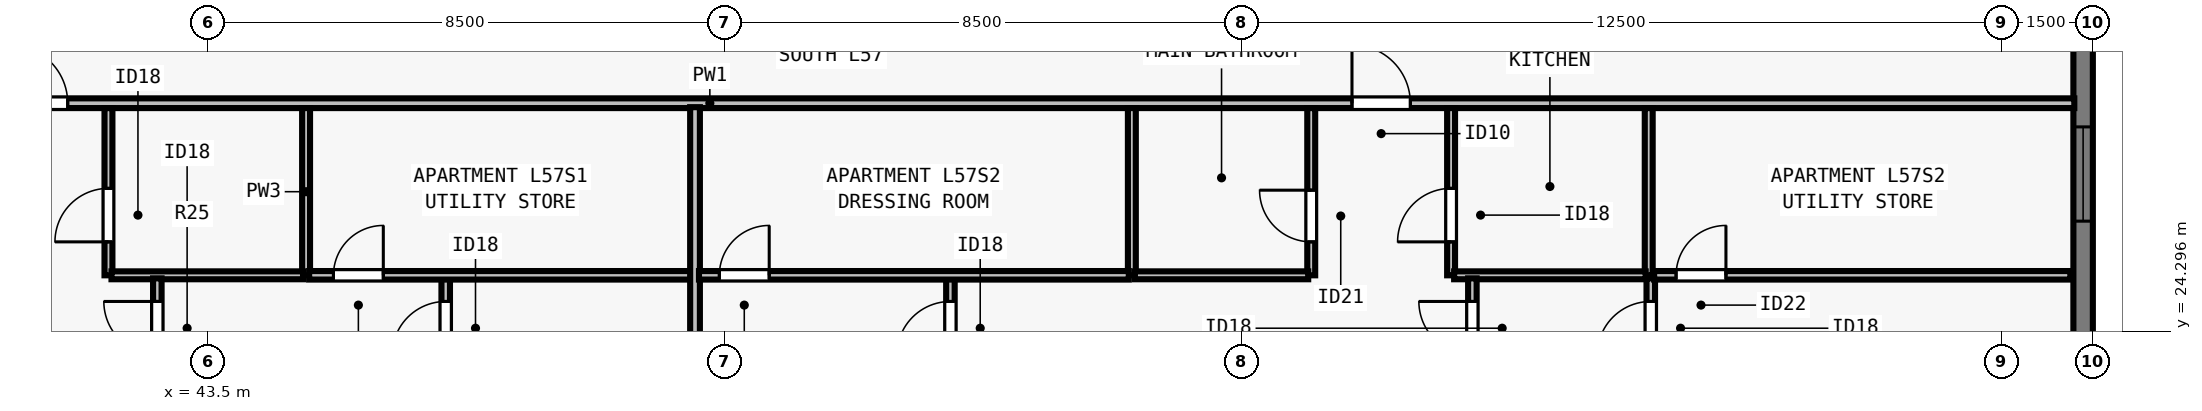
"""IFC4 building model, lengths in metres.
Left out: names, types, materials, properties, quantities, classifications, styles, units other than length and angle.
Written with IfcOpenShell. Run it as: python <this file> out.ifc"""

import sys

from ifc_helpers import new_model, si_unit, direction, frame, frame_2d, origin, place, context, subcontext, project, spatial, rectangle, extrude, element, fill, save


model = new_model("IFC4")
c1 = context("Model", 3, precision=1e-05, world=origin(), true_north=direction((0.0, 1.0)))
c2 = subcontext(c1, "Body", "Model", "MODEL_VIEW")
j1 = project(units=[si_unit("LENGTHUNIT", "METRE"), si_unit("PLANEANGLEUNIT", "RADIAN")], contexts=[c1])
p1 = place(None, origin())
s1 = spatial("IfcSite", under=j1, at=p1, CompositionType="ELEMENT")
p2 = place(p1, origin())
s2 = spatial("IfcBuilding", under=s1, at=p2, CompositionType="ELEMENT")
p3 = place(p2, frame((0.0, 0.0, 209.5)))
s3 = spatial("IfcBuildingStorey", under=s2, at=p3, CompositionType="ELEMENT", Elevation=209.5)
p4 = place(p3, frame((74.34, 56.5, 0.0), z_axis=(0.0, 0.0, 1.0), x_axis=(0.0, -1.0, 0.0)))
e1 = element("IfcWall", 1, at=p4, inside=s3, PredefinedType="SOLIDWALL", context=c2, shape_type="SweptSolid", body=[
    extrude(rectangle(XDim=34.702, YDim=0.32, at=frame_2d((17.351, 0.0))), origin(), (0.0, 0.0, 1.0), 3.29),
])
p5 = place(p4, frame((4.163, 0.0, 0.8)))
e2 = element("IfcOpeningElement", 2, at=p5, cuts=e1, PredefinedType="OPENING", context=c2, shape_type="SweptSolid", body=[
    extrude(rectangle(XDim=1.85, YDim=1.678, at=frame_2d((0.925, 0.839))), frame((0.0, 0.17, 0.0), z_axis=(0.0, -1.0, 0.0), x_axis=(1.0, 0.0, 0.0)), (0.0, 0.0, 1.0), 0.34),
])
p6 = place(p4, frame((6.888, 0.0, 0.8)))
e3 = element("IfcOpeningElement", 3, at=p6, cuts=e1, PredefinedType="OPENING", context=c2, shape_type="SweptSolid", body=[
    extrude(rectangle(XDim=1.55, YDim=1.678, at=frame_2d((0.775, 0.839))), frame((0.0, 0.17, 0.0), z_axis=(0.0, -1.0, 0.0), x_axis=(1.0, 0.0, 0.0)), (0.0, 0.0, 1.0), 0.34),
])
p7 = place(p4, frame((10.113, 0.0, 0.8)))
e4 = element("IfcOpeningElement", 4, at=p7, cuts=e1, PredefinedType="OPENING", context=c2, shape_type="SweptSolid", body=[
    extrude(rectangle(XDim=1.85, YDim=1.678, at=frame_2d((0.925, 0.839))), frame((0.0, 0.17, 0.0), z_axis=(0.0, -1.0, 0.0), x_axis=(1.0, 0.0, 0.0)), (0.0, 0.0, 1.0), 0.34),
])
p8 = place(p4, frame((14.888, 0.0, 0.8)))
e5 = element("IfcOpeningElement", 5, at=p8, cuts=e1, PredefinedType="OPENING", context=c2, shape_type="SweptSolid", body=[
    extrude(rectangle(XDim=1.55, YDim=1.678, at=frame_2d((0.775, 0.839))), frame((0.0, 0.17, 0.0), z_axis=(0.0, -1.0, 0.0), x_axis=(1.0, 0.0, 0.0)), (0.0, 0.0, 1.0), 0.34),
])
p9 = place(p4, frame((18.114, 0.0, 0.8)))
e6 = element("IfcOpeningElement", 6, at=p9, cuts=e1, PredefinedType="OPENING", context=c2, shape_type="SweptSolid", body=[
    extrude(rectangle(XDim=1.85, YDim=1.678, at=frame_2d((0.925, 0.839))), frame((0.0, 0.17, 0.0), z_axis=(0.0, -1.0, 0.0), x_axis=(1.0, 0.0, 0.0)), (0.0, 0.0, 1.0), 0.34),
])
p10 = place(p4, frame((23.614, 0.0, 0.8)))
e7 = element("IfcOpeningElement", 7, at=p10, cuts=e1, PredefinedType="OPENING", context=c2, shape_type="SweptSolid", body=[
    extrude(rectangle(XDim=1.85, YDim=1.678, at=frame_2d((0.925, 0.839))), frame((0.0, 0.17, 0.0), z_axis=(0.0, -1.0, 0.0), x_axis=(1.0, 0.0, 0.0)), (0.0, 0.0, 1.0), 0.34),
])
p11 = place(p4, frame((28.839, 0.0, 0.8)))
e8 = element("IfcOpeningElement", 8, at=p11, cuts=e1, PredefinedType="OPENING", context=c2, shape_type="SweptSolid", body=[
    extrude(rectangle(XDim=1.55, YDim=1.678, at=frame_2d((0.775, 0.839))), frame((0.0, 0.17, 0.0), z_axis=(0.0, -1.0, 0.0), x_axis=(1.0, 0.0, 0.0)), (0.0, 0.0, 1.0), 0.34),
])
p12 = place(p3, frame((29.805, 28.05, 0.0), z_axis=(0.0, 0.0, 1.0), x_axis=(1.0, 0.0, 0.0)))
e9 = element("IfcWall", 9, at=p12, inside=s3, PredefinedType="PARTITIONING", context=c2, shape_type="SweptSolid", body=[
    extrude(rectangle(XDim=44.39, YDim=0.16, at=frame_2d((22.195, 0.0))), origin(), (0.0, 0.0, 1.0), 2.958),
])
p13 = place(p12, frame((10.431, 0.0, 0.0)))
e10 = element("IfcOpeningElement", 10, at=p13, cuts=e9, PredefinedType="OPENING", context=c2, shape_type="SweptSolid", body=[
    extrude(rectangle(XDim=0.96, YDim=2.18, at=frame_2d((0.48, 1.09))), frame((0.0, 0.09, 0.0), z_axis=(0.0, -1.0, 0.0), x_axis=(1.0, 0.0, 0.0)), (0.0, 0.0, 1.0), 0.18),
])
p14 = place(p12, frame((32.511, 0.0, 0.0)))
e11 = element("IfcOpeningElement", 11, at=p14, cuts=e9, PredefinedType="OPENING", context=c2, shape_type="SweptSolid", body=[
    extrude(rectangle(XDim=0.96, YDim=2.18, at=frame_2d((0.48, 1.09))), frame((0.0, 0.09, 0.0), z_axis=(0.0, -1.0, 0.0), x_axis=(1.0, 0.0, 0.0)), (0.0, 0.0, 1.0), 0.18),
])
p15 = place(p3, frame((45.116, 25.22, 0.0), z_axis=(0.0, 0.0, 1.0), x_axis=(0.0, 1.0, 0.0)))
e12 = element("IfcWall", 12, at=p15, inside=s3, PredefinedType="PLUMBINGWALL", context=c2, shape_type="SweptSolid", body=[
    extrude(rectangle(XDim=2.75, YDim=0.13, at=frame_2d((1.375, 0.0))), origin(), (0.0, 0.0, 1.0), 3.29),
])
p16 = place(p3, frame((41.866, 25.22, 0.0), z_axis=(0.0, 0.0, 1.0), x_axis=(0.0, 1.0, 0.0)))
e13 = element("IfcWall", 13, at=p16, inside=s3, PredefinedType="PLUMBINGWALL", context=c2, shape_type="SweptSolid", body=[
    extrude(rectangle(XDim=2.75, YDim=0.13, at=frame_2d((1.375, 0.0))), origin(), (0.0, 0.0, 1.0), 2.573),
])
p17 = place(p16, frame((0.55, 0.0, 0.0)))
e14 = element("IfcOpeningElement", 14, at=p17, cuts=e13, PredefinedType="OPENING", context=c2, shape_type="SweptSolid", body=[
    extrude(rectangle(XDim=0.88, YDim=2.1, at=frame_2d((0.44, 1.05))), frame((0.0, 0.075, 0.0), z_axis=(0.0, -1.0, 0.0), x_axis=(1.0, 0.0, 0.0)), (0.0, 0.0, 1.0), 0.15),
])
p18 = place(p3, frame((41.916, 25.22, 0.0), z_axis=(0.0, 0.0, 1.0), x_axis=(1.0, 0.0, 0.0)))
e15 = element("IfcWall", 15, at=p18, inside=s3, PredefinedType="PLUMBINGWALL", context=c2, shape_type="SweptSolid", body=[
    extrude(rectangle(XDim=3.15, YDim=0.13, at=frame_2d((1.575, 0.0))), origin(), (0.0, 0.0, 1.0), 3.29),
])
p19 = place(p3, frame((47.413, 16.88, 0.0), z_axis=(0.0, 0.0, 1.0), x_axis=(0.0, 1.0, 0.0)))
e16 = element("IfcWall", 16, at=p19, inside=s3, PredefinedType="PARTITIONING", context=c2, shape_type="SweptSolid", body=[
    extrude(rectangle(XDim=8.38, YDim=0.14, at=frame_2d((4.19, 0.0))), origin(), (0.0, 0.0, 1.0), 2.573),
])
p20 = place(p19, frame((7.03, 0.0, 0.0)))
e17 = element("IfcOpeningElement", 17, at=p20, cuts=e16, PredefinedType="OPENING", context=c2, shape_type="SweptSolid", body=[
    extrude(rectangle(XDim=0.88, YDim=2.1, at=frame_2d((0.44, 1.05))), frame((0.0, 0.08, 0.0), z_axis=(0.0, -1.0, 0.0), x_axis=(1.0, 0.0, 0.0)), (0.0, 0.0, 1.0), 0.16),
])
p21 = place(p3, frame((45.166, 25.22, 0.0), z_axis=(0.0, 0.0, 1.0), x_axis=(1.0, 0.0, 0.0)))
e18 = element("IfcWall", 18, at=p21, inside=s3, PredefinedType="PARTITIONING", context=c2, shape_type="SweptSolid", body=[
    extrude(rectangle(XDim=6.396, YDim=0.14, at=frame_2d((3.198, 0.0))), origin(), (0.0, 0.0, 1.0), 3.29),
])
p22 = place(p21, frame((0.4, 0.0, 0.0)))
e19 = element("IfcOpeningElement", 19, at=p22, cuts=e18, PredefinedType="OPENING", context=c2, shape_type="SweptSolid", body=[
    extrude(rectangle(XDim=0.82, YDim=2.1, at=frame_2d((0.41, 1.05))), frame((0.0, 0.08, 0.0), z_axis=(0.0, -1.0, 0.0), x_axis=(1.0, 0.0, 0.0)), (0.0, 0.0, 1.0), 0.16),
])
p23 = place(p3, frame((42.67, 16.88, 0.0), z_axis=(0.0, 0.0, 1.0), x_axis=(0.0, 1.0, 0.0)))
e20 = element("IfcWall", 20, at=p23, inside=s3, PredefinedType="PARTITIONING", context=c2, shape_type="SweptSolid", body=[
    extrude(rectangle(XDim=8.29, YDim=0.14, at=frame_2d((4.145, 0.0))), origin(), (0.0, 0.0, 1.0), 3.29),
])
p24 = place(p23, frame((7.03, 0.0, 0.0)))
e21 = element("IfcOpeningElement", 21, at=p24, cuts=e20, PredefinedType="OPENING", context=c2, shape_type="SweptSolid", body=[
    extrude(rectangle(XDim=0.88, YDim=2.1, at=frame_2d((0.44, 1.05))), frame((0.0, 0.08, 0.0), z_axis=(0.0, -1.0, 0.0), x_axis=(1.0, 0.0, 0.0)), (0.0, 0.0, 1.0), 0.16),
])
p25 = place(p3, frame((51.512, 16.805, 0.0), z_axis=(0.0, 0.0, 1.0), x_axis=(0.0, 1.0, 0.0)))
e22 = element("IfcWall", 22, at=p25, inside=s3, PredefinedType="PARTITIONING", context=c2, shape_type="SweptSolid", body=[
    extrude(rectangle(XDim=11.18, YDim=0.16, at=frame_2d((5.59, 0.0))), origin(), (0.0, 0.0, 1.0), 2.958),
])
p26 = place(p3, frame((58.696, 25.22, 0.0), z_axis=(0.0, 0.0, 1.0), x_axis=(0.0, 1.0, 0.0)))
e23 = element("IfcWall", 23, at=p26, inside=s3, PredefinedType="PLUMBINGWALL", context=c2, shape_type="SweptSolid", body=[
    extrude(rectangle(XDim=2.75, YDim=0.13, at=frame_2d((1.375, 0.0))), origin(), (0.0, 0.0, 1.0), 3.29),
])
p27 = place(p3, frame((61.646, 25.22, 0.0), z_axis=(0.0, 0.0, 1.0), x_axis=(0.0, 1.0, 0.0)))
e24 = element("IfcWall", 24, at=p27, inside=s3, PredefinedType="PLUMBINGWALL", context=c2, shape_type="SweptSolid", body=[
    extrude(rectangle(XDim=2.75, YDim=0.13, at=frame_2d((1.375, 0.0))), origin(), (0.0, 0.0, 1.0), 3.29),
])
p28 = place(p27, frame((0.55, 0.0, 0.0)))
e25 = element("IfcOpeningElement", 25, at=p28, cuts=e24, PredefinedType="OPENING", context=c2, shape_type="SweptSolid", body=[
    extrude(rectangle(XDim=0.85, YDim=2.08, at=frame_2d((0.425, 1.04))), frame((0.0, 0.075, 0.0), z_axis=(0.0, -1.0, 0.0), x_axis=(1.0, 0.0, 0.0)), (0.0, 0.0, 1.0), 0.15),
])
p29 = place(p3, frame((58.746, 25.22, 0.0), z_axis=(0.0, 0.0, 1.0), x_axis=(1.0, 0.0, 0.0)))
e26 = element("IfcWall", 26, at=p29, inside=s3, PredefinedType="PLUMBINGWALL", context=c2, shape_type="SweptSolid", body=[
    extrude(rectangle(XDim=2.85, YDim=0.13, at=frame_2d((1.425, 0.0))), origin(), (0.0, 0.0, 1.0), 3.29),
])
p30 = place(p3, frame((67.196, 25.22, 0.0), z_axis=(0.0, 0.0, 1.0), x_axis=(0.0, 1.0, 0.0)))
e27 = element("IfcWall", 27, at=p30, inside=s3, PredefinedType="PLUMBINGWALL", context=c2, shape_type="SweptSolid", body=[
    extrude(rectangle(XDim=2.75, YDim=0.13, at=frame_2d((1.375, 0.0))), origin(), (0.0, 0.0, 1.0), 3.29),
])
p31 = place(p3, frame((63.946, 25.22, 0.0), z_axis=(0.0, 0.0, 1.0), x_axis=(0.0, 1.0, 0.0)))
e28 = element("IfcWall", 28, at=p31, inside=s3, PredefinedType="PLUMBINGWALL", context=c2, shape_type="SweptSolid", body=[
    extrude(rectangle(XDim=2.75, YDim=0.13, at=frame_2d((1.375, 0.0))), origin(), (0.0, 0.0, 1.0), 2.573),
])
p32 = place(p31, frame((0.55, 0.0, 0.0)))
e29 = element("IfcOpeningElement", 29, at=p32, cuts=e28, PredefinedType="OPENING", context=c2, shape_type="SweptSolid", body=[
    extrude(rectangle(XDim=0.88, YDim=2.1, at=frame_2d((0.44, 1.05))), frame((0.0, 0.075, 0.0), z_axis=(0.0, -1.0, 0.0), x_axis=(1.0, 0.0, 0.0)), (0.0, 0.0, 1.0), 0.15),
])
p33 = place(p3, frame((63.996, 25.22, 0.0), z_axis=(0.0, 0.0, 1.0), x_axis=(1.0, 0.0, 0.0)))
e30 = element("IfcWall", 30, at=p33, inside=s3, PredefinedType="PLUMBINGWALL", context=c2, shape_type="SweptSolid", body=[
    extrude(rectangle(XDim=3.15, YDim=0.13, at=frame_2d((1.575, 0.0))), origin(), (0.0, 0.0, 1.0), 3.29),
])
p34 = place(p3, frame((55.712, 16.88, 0.0), z_axis=(0.0, 0.0, 1.0), x_axis=(0.0, 1.0, 0.0)))
e31 = element("IfcWall", 31, at=p34, inside=s3, PredefinedType="PARTITIONING", context=c2, shape_type="SweptSolid", body=[
    extrude(rectangle(XDim=8.38, YDim=0.14, at=frame_2d((4.19, 0.0))), origin(), (0.0, 0.0, 1.0), 3.29),
])
p35 = place(p34, frame((7.03, 0.0, 0.0)))
e32 = element("IfcOpeningElement", 32, at=p35, cuts=e31, PredefinedType="OPENING", context=c2, shape_type="SweptSolid", body=[
    extrude(rectangle(XDim=0.88, YDim=2.1, at=frame_2d((0.44, 1.05))), frame((0.0, 0.08, 0.0), z_axis=(0.0, -1.0, 0.0), x_axis=(1.0, 0.0, 0.0)), (0.0, 0.0, 1.0), 0.16),
])
p36 = place(p3, frame((51.577, 25.22, 0.0), z_axis=(0.0, 0.0, 1.0), x_axis=(1.0, 0.0, 0.0)))
e33 = element("IfcWall", 33, at=p36, inside=s3, PredefinedType="PARTITIONING", context=c2, shape_type="SweptSolid", body=[
    extrude(rectangle(XDim=7.069, YDim=0.14, at=frame_2d((3.534, 0.0))), origin(), (0.0, 0.0, 1.0), 3.29),
])
p37 = place(p36, frame((0.335, 0.0, 0.0)))
e34 = element("IfcOpeningElement", 34, at=p37, cuts=e33, PredefinedType="OPENING", context=c2, shape_type="SweptSolid", body=[
    extrude(rectangle(XDim=0.82, YDim=2.1, at=frame_2d((0.41, 1.05))), frame((0.0, 0.08, 0.0), z_axis=(0.0, -1.0, 0.0), x_axis=(1.0, 0.0, 0.0)), (0.0, 0.0, 1.0), 0.16),
])
p38 = place(p3, frame((67.23, 16.88, 0.0), z_axis=(0.0, 0.0, 1.0), x_axis=(0.0, 1.0, 0.0)))
e35 = element("IfcWall", 35, at=p38, inside=s3, PredefinedType="PARTITIONING", context=c2, shape_type="SweptSolid", body=[
    extrude(rectangle(XDim=8.29, YDim=0.14, at=frame_2d((4.145, 0.0))), origin(), (0.0, 0.0, 1.0), 2.573),
])
p39 = place(p38, frame((7.03, 0.0, 0.0)))
e36 = element("IfcOpeningElement", 36, at=p39, cuts=e35, PredefinedType="OPENING", context=c2, shape_type="SweptSolid", body=[
    extrude(rectangle(XDim=0.88, YDim=2.1, at=frame_2d((0.44, 1.05))), frame((0.0, 0.08, 0.0), z_axis=(0.0, -1.0, 0.0), x_axis=(1.0, 0.0, 0.0)), (0.0, 0.0, 1.0), 0.16),
])
p40 = place(p3, frame((67.285, 25.22, 0.0), z_axis=(0.0, 0.0, 1.0), x_axis=(1.0, 0.0, 0.0)))
e37 = element("IfcWall", 37, at=p40, inside=s3, PredefinedType="PARTITIONING", context=c2, shape_type="SweptSolid", body=[
    extrude(rectangle(XDim=6.845, YDim=0.14, at=frame_2d((3.422, 0.0))), origin(), (0.0, 0.0, 1.0), 2.958),
])
p41 = place(p40, frame((0.361, 0.0, 0.0)))
e38 = element("IfcOpeningElement", 38, at=p41, cuts=e37, PredefinedType="OPENING", context=c2, shape_type="SweptSolid", body=[
    extrude(rectangle(XDim=0.82, YDim=2.1, at=frame_2d((0.41, 1.05))), frame((0.0, 0.08, 0.0), z_axis=(0.0, -1.0, 0.0), x_axis=(1.0, 0.0, 0.0)), (0.0, 0.0, 1.0), 0.16),
])
p42 = place(p3, frame((64.296, 16.88, 0.0), z_axis=(0.0, 0.0, 1.0), x_axis=(0.0, 1.0, 0.0)))
e39 = element("IfcWall", 39, at=p42, inside=s3, PredefinedType="PARTITIONING", context=c2, shape_type="SweptSolid", body=[
    extrude(rectangle(XDim=8.29, YDim=0.14, at=frame_2d((4.145, 0.0))), origin(), (0.0, 0.0, 1.0), 2.573),
])
p43 = place(p42, frame((7.03, 0.0, 0.0)))
e40 = element("IfcOpeningElement", 40, at=p43, cuts=e39, PredefinedType="OPENING", context=c2, shape_type="SweptSolid", body=[
    extrude(rectangle(XDim=0.88, YDim=2.1, at=frame_2d((0.44, 1.05))), frame((0.0, 0.08, 0.0), z_axis=(0.0, -1.0, 0.0), x_axis=(1.0, 0.0, 0.0)), (0.0, 0.0, 1.0), 0.16),
])
p44 = place(p11, origin())
e41 = element("IfcWindow", 41, at=p44, inside=s3, PartitioningType="SINGLE_PANEL", PredefinedType="WINDOW", context=c2, shape_type="SweptSolid", body=[
    extrude(rectangle(XDim=1.55, YDim=1.678, at=frame_2d((0.775, 0.839))), frame((0.0, -0.05, 0.0), z_axis=(0.0, -1.0, 0.0), x_axis=(1.0, 0.0, 0.0)), (0.0, 0.0, 1.0), 0.06),
])
fill(e8, e41)
p45 = place(p17, origin())
e42 = element("IfcDoor", 42, at=p45, inside=s3, OperationType="SINGLE_SWING_LEFT", PredefinedType="DOOR", context=c2, shape_type="SweptSolid", body=[
    extrude(rectangle(XDim=0.88, YDim=2.1, at=frame_2d((0.44, 1.05))), frame((0.0, 0.025, 0.0), z_axis=(0.0, -1.0, 0.0), x_axis=(1.0, 0.0, 0.0)), (0.0, 0.0, 1.0), 0.05),
])
fill(e14, e42)
p46 = place(p22, origin())
e43 = element("IfcDoor", 43, at=p46, inside=s3, OperationType="SINGLE_SWING_RIGHT", PredefinedType="DOOR", context=c2, shape_type="SweptSolid", body=[
    extrude(rectangle(XDim=0.82, YDim=2.1, at=frame_2d((0.41, 1.05))), frame((0.0, 0.025, 0.0), z_axis=(0.0, -1.0, 0.0), x_axis=(1.0, 0.0, 0.0)), (0.0, 0.0, 1.0), 0.05),
])
fill(e19, e43)
p47 = place(p20, origin())
e44 = element("IfcDoor", 44, at=p47, inside=s3, OperationType="SINGLE_SWING_LEFT", PredefinedType="DOOR", context=c2, shape_type="SweptSolid", body=[
    extrude(rectangle(XDim=0.88, YDim=2.1, at=frame_2d((0.44, 1.05))), frame((0.0, 0.025, 0.0), z_axis=(0.0, -1.0, 0.0), x_axis=(1.0, 0.0, 0.0)), (0.0, 0.0, 1.0), 0.05),
])
fill(e17, e44)
p48 = place(p24, origin())
e45 = element("IfcDoor", 45, at=p48, inside=s3, OperationType="SINGLE_SWING_RIGHT", PredefinedType="DOOR", context=c2, shape_type="SweptSolid", body=[
    extrude(rectangle(XDim=0.88, YDim=2.1, at=frame_2d((0.44, 1.05))), frame((0.0, 0.025, 0.0), z_axis=(0.0, -1.0, 0.0), x_axis=(1.0, 0.0, 0.0)), (0.0, 0.0, 1.0), 0.05),
])
fill(e21, e45)
p49 = place(p13, origin())
e46 = element("IfcDoor", 46, at=p49, inside=s3, OperationType="SINGLE_SWING_LEFT", PredefinedType="DOOR", context=c2, shape_type="SweptSolid", body=[
    extrude(rectangle(XDim=0.96, YDim=2.18, at=frame_2d((0.48, 1.09))), frame((0.0, 0.025, 0.0), z_axis=(0.0, -1.0, 0.0), x_axis=(1.0, 0.0, 0.0)), (0.0, 0.0, 1.0), 0.05),
])
fill(e10, e46)
p50 = place(p28, origin())
e47 = element("IfcDoor", 47, at=p50, inside=s3, OperationType="SINGLE_SWING_RIGHT", PredefinedType="DOOR", context=c2, shape_type="SweptSolid", body=[
    extrude(rectangle(XDim=0.85, YDim=2.08, at=frame_2d((0.425, 1.04))), frame((0.0, 0.025, 0.0), z_axis=(0.0, -1.0, 0.0), x_axis=(1.0, 0.0, 0.0)), (0.0, 0.0, 1.0), 0.05),
])
fill(e25, e47)
p51 = place(p32, origin())
e48 = element("IfcDoor", 48, at=p51, inside=s3, OperationType="SINGLE_SWING_LEFT", PredefinedType="DOOR", context=c2, shape_type="SweptSolid", body=[
    extrude(rectangle(XDim=0.88, YDim=2.1, at=frame_2d((0.44, 1.05))), frame((0.0, 0.025, 0.0), z_axis=(0.0, -1.0, 0.0), x_axis=(1.0, 0.0, 0.0)), (0.0, 0.0, 1.0), 0.05),
])
fill(e29, e48)
p52 = place(p37, origin())
e49 = element("IfcDoor", 49, at=p52, inside=s3, OperationType="SINGLE_SWING_RIGHT", PredefinedType="DOOR", context=c2, shape_type="SweptSolid", body=[
    extrude(rectangle(XDim=0.82, YDim=2.1, at=frame_2d((0.41, 1.05))), frame((0.0, 0.025, 0.0), z_axis=(0.0, -1.0, 0.0), x_axis=(1.0, 0.0, 0.0)), (0.0, 0.0, 1.0), 0.05),
])
fill(e34, e49)
p53 = place(p35, origin())
e50 = element("IfcDoor", 50, at=p53, inside=s3, OperationType="SINGLE_SWING_LEFT", PredefinedType="DOOR", context=c2, shape_type="SweptSolid", body=[
    extrude(rectangle(XDim=0.88, YDim=2.1, at=frame_2d((0.44, 1.05))), frame((0.0, 0.025, 0.0), z_axis=(0.0, -1.0, 0.0), x_axis=(1.0, 0.0, 0.0)), (0.0, 0.0, 1.0), 0.05),
])
fill(e32, e50)
p54 = place(p41, origin())
e51 = element("IfcDoor", 51, at=p54, inside=s3, OperationType="SINGLE_SWING_RIGHT", PredefinedType="DOOR", context=c2, shape_type="SweptSolid", body=[
    extrude(rectangle(XDim=0.82, YDim=2.1, at=frame_2d((0.41, 1.05))), frame((0.0, 0.025, 0.0), z_axis=(0.0, -1.0, 0.0), x_axis=(1.0, 0.0, 0.0)), (0.0, 0.0, 1.0), 0.05),
])
fill(e38, e51)
p55 = place(p39, origin())
e52 = element("IfcDoor", 52, at=p55, inside=s3, OperationType="SINGLE_SWING_LEFT", PredefinedType="DOOR", context=c2, shape_type="SweptSolid", body=[
    extrude(rectangle(XDim=0.88, YDim=2.1, at=frame_2d((0.44, 1.05))), frame((0.0, 0.025, 0.0), z_axis=(0.0, -1.0, 0.0), x_axis=(1.0, 0.0, 0.0)), (0.0, 0.0, 1.0), 0.05),
])
fill(e36, e52)
p56 = place(p43, origin())
e53 = element("IfcDoor", 53, at=p56, inside=s3, OperationType="SINGLE_SWING_RIGHT", PredefinedType="DOOR", context=c2, shape_type="SweptSolid", body=[
    extrude(rectangle(XDim=0.88, YDim=2.1, at=frame_2d((0.44, 1.05))), frame((0.0, 0.025, 0.0), z_axis=(0.0, -1.0, 0.0), x_axis=(1.0, 0.0, 0.0)), (0.0, 0.0, 1.0), 0.05),
])
fill(e40, e53)
p57 = place(p14, origin())
e54 = element("IfcDoor", 54, at=p57, inside=s3, OperationType="SINGLE_SWING_LEFT", PredefinedType="DOOR", context=c2, shape_type="SweptSolid", body=[
    extrude(rectangle(XDim=0.96, YDim=2.18, at=frame_2d((0.48, 1.09))), frame((0.0, 0.025, 0.0), z_axis=(0.0, -1.0, 0.0), x_axis=(1.0, 0.0, 0.0)), (0.0, 0.0, 1.0), 0.05),
])
fill(e11, e54)
save(model, sys.argv[1])
